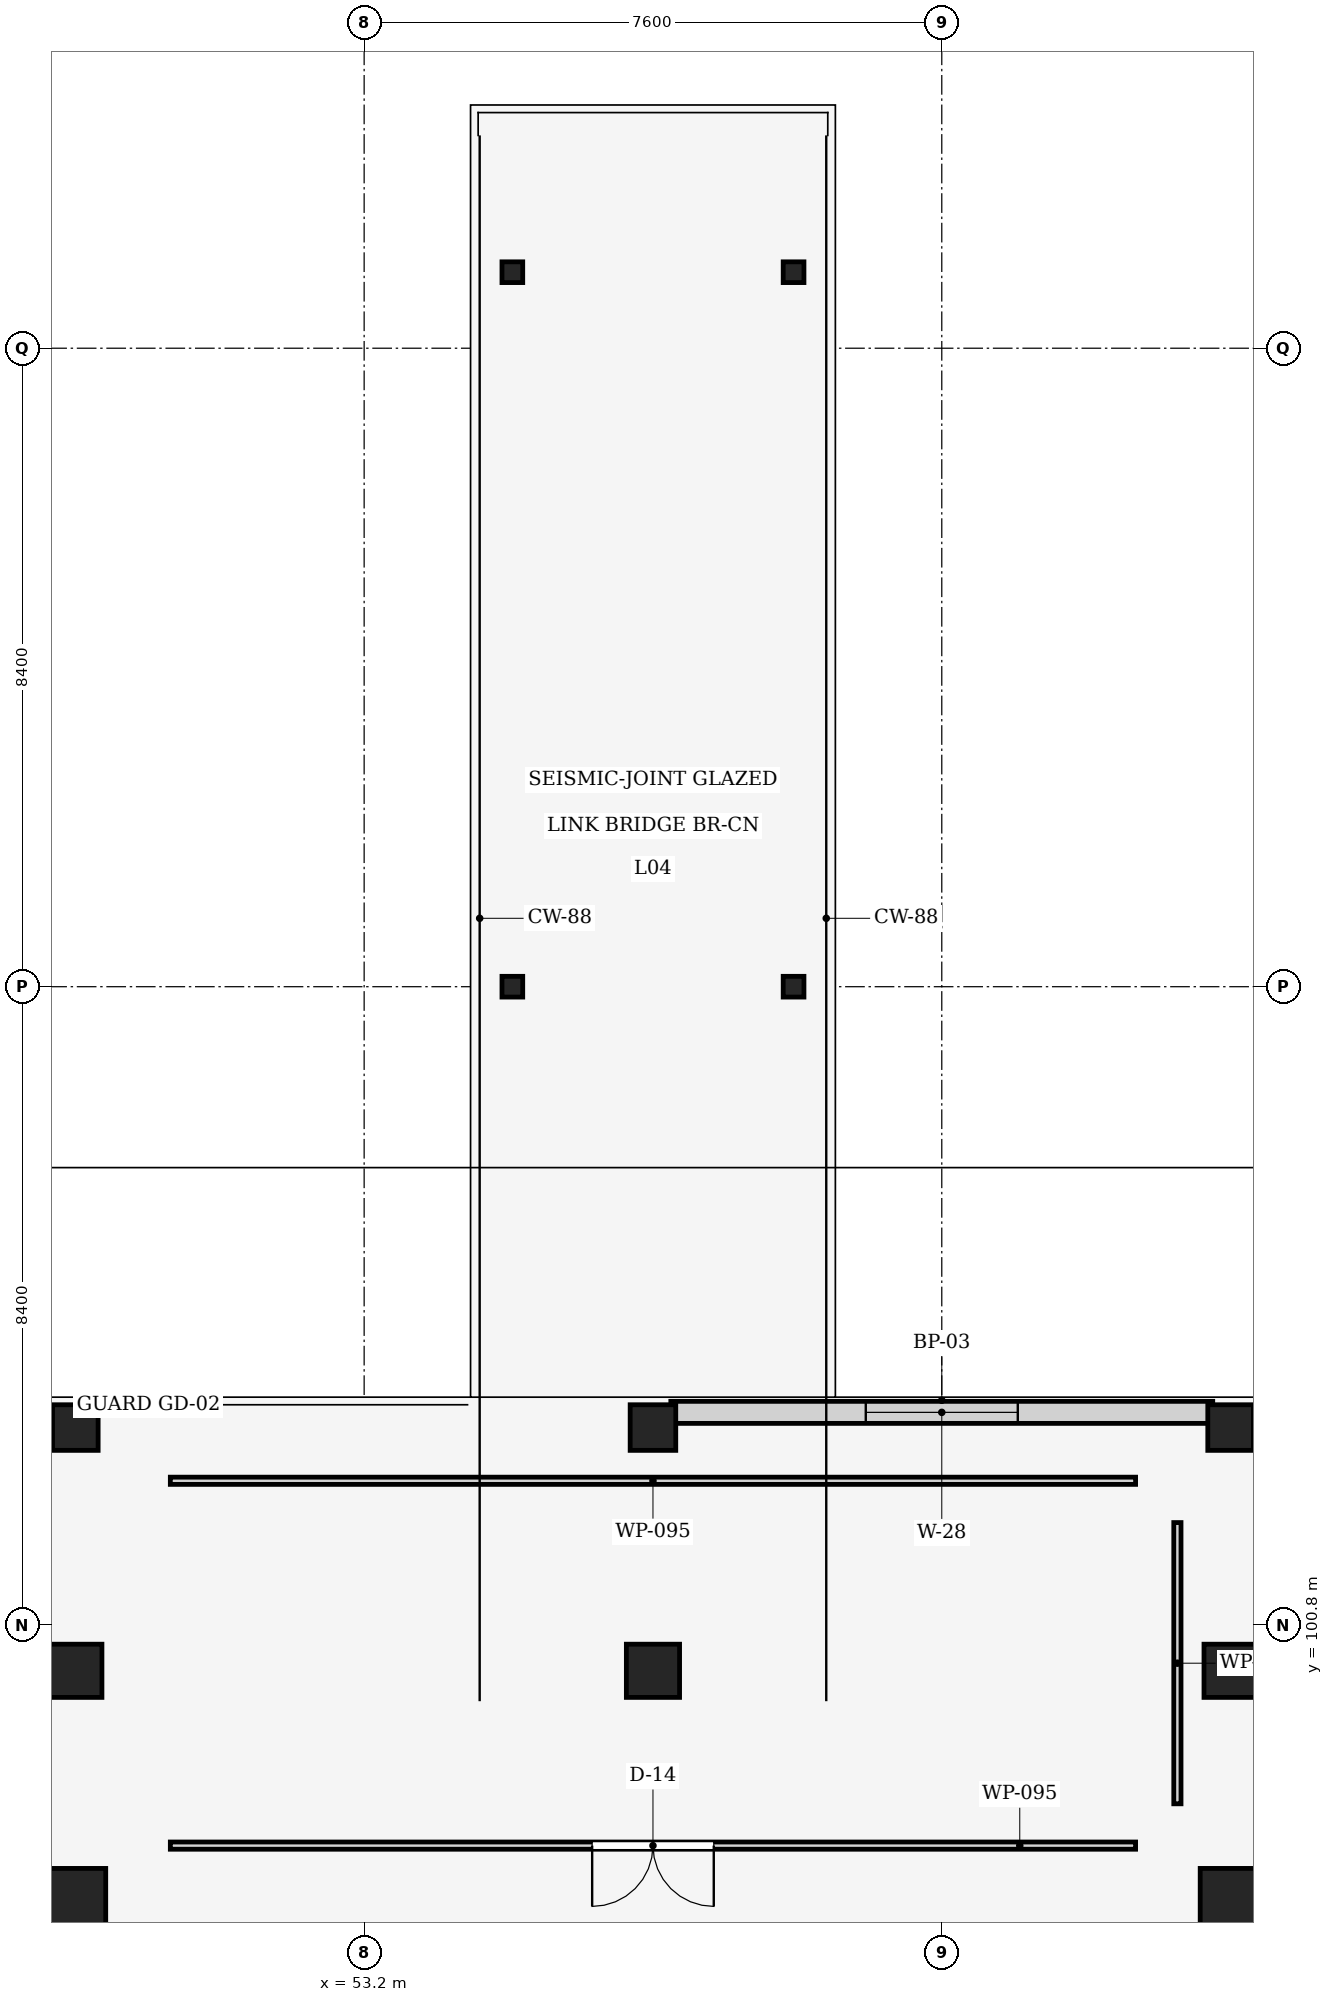
"""IFC4 building model, lengths in metres.
Left out: names, types, materials, properties, quantities, classifications, styles, units other than length and angle.
Written with IfcOpenShell. Run it as: python <this file> out.ifc"""

import sys

from ifc_helpers import new_model, si_unit, direction, frame, frame_2d, origin, origin_2d, place, context, subcontext, project, spatial, rectangle, hollow_circle, extrude, element, fill, save


model = new_model("IFC4")
c1 = context("Model", 3, precision=1e-05, world=origin(), true_north=direction((0.0, 1.0)))
c2 = subcontext(c1, "Body", "Model", "MODEL_VIEW")
j1 = project(units=[si_unit("LENGTHUNIT", "METRE"), si_unit("PLANEANGLEUNIT", "RADIAN")], contexts=[c1])
p1 = place(None, origin())
s1 = spatial("IfcSite", under=j1, at=p1, CompositionType="ELEMENT")
p2 = place(p1, origin())
s2 = spatial("IfcBuilding", under=s1, at=p2, CompositionType="ELEMENT")
p3 = place(p2, frame((0.0, 0.0, 17.25)))
s3 = spatial("IfcBuildingStorey", under=s2, at=p3, CompositionType="ELEMENT", Elevation=17.25)
for number, where, z_axis, x_axis in (
    (1, (49.4, 97.2, 0.0), (0.0, 0.0, 1.0), (1.0, 0.0, 0.0)),
    (2, (64.6, 97.2, 0.0), (0.0, 0.0, 1.0), (1.0, 0.0, 0.0)),
):
    element("IfcColumn", number, at=place(p3, frame(where, z_axis=z_axis, x_axis=x_axis)), inside=s3, PredefinedType="COLUMN", context=c2, shape_type="SweptSolid", body=[
        extrude(rectangle(XDim=0.8, YDim=0.8, at=origin_2d()), origin(), (0.0, 0.0, 1.0), 4.05),
    ])
for number, where, z_axis, x_axis in (
    (3, (49.4, 100.2, 0.0), (0.0, 0.0, 1.0), (1.0, 0.0, 0.0)),
    (4, (57.0, 100.2, 0.0), (0.0, 0.0, 1.0), (1.0, 0.0, 0.0)),
    (5, (64.6, 100.2, 0.0), (0.0, 0.0, 1.0), (1.0, 0.0, 0.0)),
):
    element("IfcColumn", number, at=place(p3, frame(where, z_axis=z_axis, x_axis=x_axis)), inside=s3, PredefinedType="COLUMN", context=c2, shape_type="SweptSolid", body=[
        extrude(rectangle(XDim=0.7, YDim=0.7, at=origin_2d()), origin(), (0.0, 0.0, 1.0), 4.05),
    ])
for number, where, z_axis, x_axis in (
    (6, (49.4, 103.4, -0.28), (0.0, 0.0, 1.0), (1.0, 0.0, 0.0)),
    (7, (57.0, 103.4, -0.28), (0.0, 0.0, 1.0), (1.0, 0.0, 0.0)),
    (8, (64.6, 103.4, -0.28), (0.0, 0.0, 1.0), (1.0, 0.0, 0.0)),
):
    element("IfcColumn", number, at=place(p3, frame(where, z_axis=z_axis, x_axis=x_axis)), inside=s3, PredefinedType="COLUMN", context=c2, shape_type="SweptSolid", body=[
        extrude(rectangle(XDim=0.6, YDim=0.6, at=origin_2d()), origin(), (0.0, 0.0, 1.0), 4.33),
    ])
for number, where, z_axis, x_axis in (
    (9, (55.15, 109.2, 0.0), (0.0, 0.0, 1.0), (1.0, 0.0, 0.0)),
    (10, (58.85, 109.2, 0.0), (0.0, 0.0, 1.0), (1.0, 0.0, 0.0)),
    (11, (58.85, 118.6, 0.0), (0.0, 0.0, 1.0), (1.0, 0.0, 0.0)),
    (12, (55.15, 118.6, 0.0), (0.0, 0.0, 1.0), (1.0, 0.0, 0.0)),
):
    element("IfcColumn", number, at=place(p3, frame(where, z_axis=z_axis, x_axis=x_axis)), inside=s3, PredefinedType="COLUMN", context=c2, shape_type="SweptSolid", body=[
        extrude(hollow_circle(Radius=0.136, WallThickness=0.016, at=origin_2d()), origin(), (0.0, 0.0, 1.0), 3.82),
    ])
p4 = place(p3, frame((57.235, 103.6, 0.0), z_axis=(0.0, 0.0, 1.0), x_axis=(1.0, 0.0, 0.0)))
e13 = element("IfcWall", 13, at=p4, inside=s3, PredefinedType="STANDARD", context=c2, shape_type="SweptSolid", body=[
    extrude(rectangle(XDim=7.13, YDim=0.29, at=frame_2d((3.565, 0.0))), origin(), (0.0, 0.0, 1.0), 3.085),
])
p5 = place(p4, frame((2.565, 0.0, 0.85)))
e14 = element("IfcOpeningElement", 14, at=p5, cuts=e13, PredefinedType="OPENING", context=c2, shape_type="SweptSolid", body=[
    extrude(rectangle(XDim=2.0, YDim=1.85, at=frame_2d((1.0, 0.925))), frame((0.0, 0.155, 0.0), z_axis=(0.0, -1.0, 0.0), x_axis=(1.0, 0.0, 0.0)), (0.0, 0.0, 1.0), 0.31),
])
p6 = place(p3, frame((63.35, 97.9, 0.0), z_axis=(0.0, 0.0, 1.0), x_axis=(-1.0, 0.0, 0.0)))
e15 = element("IfcWall", 15, at=p6, inside=s3, PredefinedType="PARTITIONING", context=c2, shape_type="SweptSolid", body=[
    extrude(rectangle(XDim=12.7, YDim=0.095, at=frame_2d((6.35, 0.0))), origin(), (0.0, 0.0, 1.0), 3.62),
])
p7 = place(p6, frame((5.55, 0.0, 0.0)))
e16 = element("IfcOpeningElement", 16, at=p7, cuts=e15, PredefinedType="OPENING", context=c2, shape_type="SweptSolid", body=[
    extrude(rectangle(XDim=1.6, YDim=2.22, at=frame_2d((0.8, 1.11))), frame((0.0, 0.057, 0.0), z_axis=(0.0, -1.0, 0.0), x_axis=(1.0, 0.0, 0.0)), (0.0, 0.0, 1.0), 0.115),
])
p8 = place(p3, frame((50.65, 102.7, 0.0), z_axis=(0.0, 0.0, 1.0), x_axis=(1.0, 0.0, 0.0)))
e17 = element("IfcWall", 17, at=p8, inside=s3, PredefinedType="PARTITIONING", context=c2, shape_type="SweptSolid", body=[
    extrude(rectangle(XDim=12.7, YDim=0.095, at=frame_2d((6.35, 0.0))), origin(), (0.0, 0.0, 1.0), 3.62),
])
p9 = place(p3, frame((63.9, 102.15, 0.0), z_axis=(0.0, 0.0, 1.0), x_axis=(0.0, -1.0, 0.0)))
e18 = element("IfcWall", 18, at=p9, inside=s3, PredefinedType="PARTITIONING", context=c2, shape_type="SweptSolid", body=[
    extrude(rectangle(XDim=3.7, YDim=0.095, at=frame_2d((1.85, 0.0))), origin(), (0.0, 0.0, 1.0), 3.085),
])
p10 = place(p5, origin())
e19 = element("IfcWindow", 19, at=p10, inside=s3, PartitioningType="SINGLE_PANEL", PredefinedType="WINDOW", context=c2, shape_type="SweptSolid", body=[
    extrude(rectangle(XDim=2.0, YDim=1.85, at=frame_2d((1.0, 0.925))), frame((0.0, 0.03, 0.0), z_axis=(0.0, -1.0, 0.0), x_axis=(1.0, 0.0, 0.0)), (0.0, 0.0, 1.0), 0.06),
])
fill(e14, e19)
p11 = place(p7, origin())
e20 = element("IfcDoor", 20, at=p11, inside=s3, OperationType="DOUBLE_DOOR_SINGLE_SWING", PredefinedType="DOOR", context=c2, shape_type="SweptSolid", body=[
    extrude(rectangle(XDim=1.6, YDim=2.22, at=frame_2d((0.8, 1.11))), frame((0.0, 0.025, 0.0), z_axis=(0.0, -1.0, 0.0), x_axis=(1.0, 0.0, 0.0)), (0.0, 0.0, 1.0), 0.05),
])
fill(e16, e20)
save(model, sys.argv[1])
